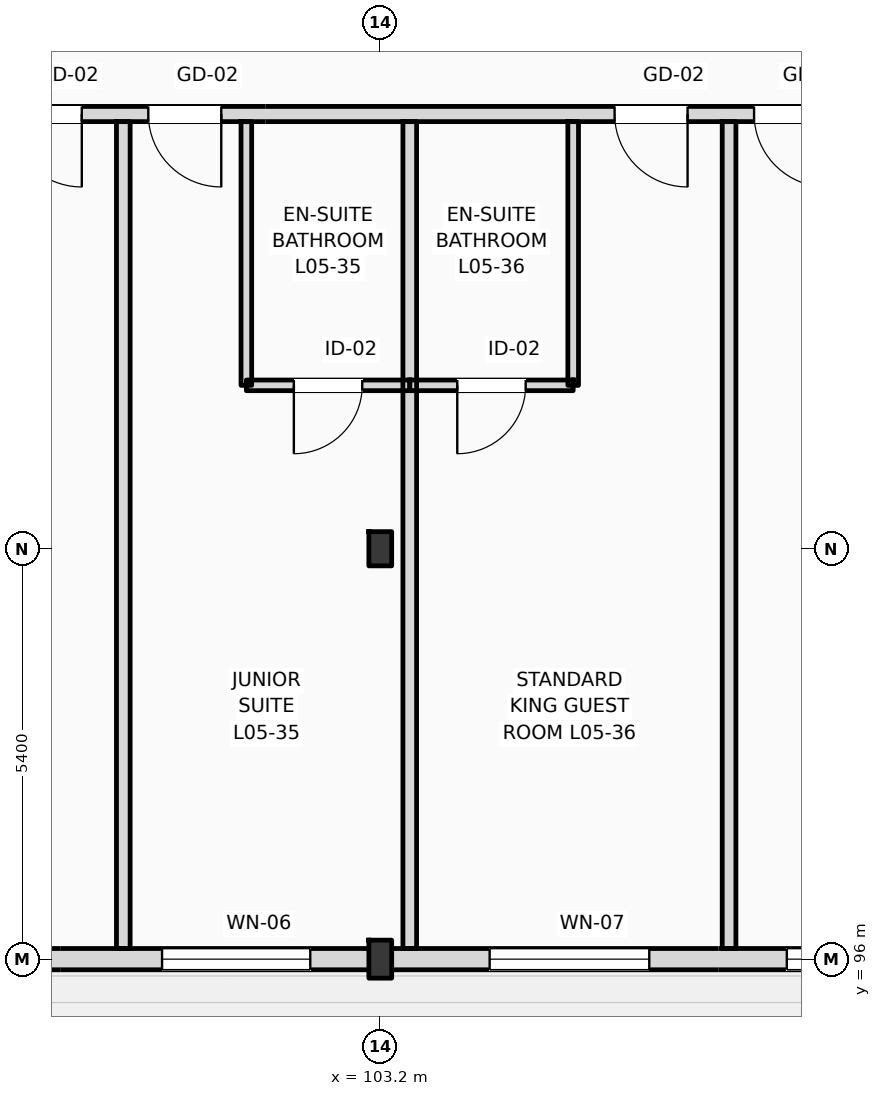
"""IFC4 building model, lengths in metres.
Left out: names, types, materials, properties, quantities, classifications, styles, units other than length and angle.
Written with IfcOpenShell. Run it as: python <this file> out.ifc"""

import sys

from ifc_helpers import new_model, si_unit, direction, frame, frame_2d, origin, origin_2d, place, context, subcontext, project, spatial, rectangle, i_section, extrude, element, fill, save


model = new_model("IFC4")
c1 = context("Model", 3, precision=1e-05, world=origin(), true_north=direction((0.0, 1.0)))
c2 = subcontext(c1, "Body", "Model", "MODEL_VIEW")
j1 = project(units=[si_unit("LENGTHUNIT", "METRE"), si_unit("PLANEANGLEUNIT", "RADIAN")], contexts=[c1])
p1 = place(None, origin())
s1 = spatial("IfcSite", under=j1, at=p1, CompositionType="ELEMENT")
p2 = place(p1, origin())
s2 = spatial("IfcBuilding", under=s1, at=p2, CompositionType="ELEMENT")
p3 = place(p2, frame((0.0, 0.0, 24.6)))
s3 = spatial("IfcBuildingStorey", under=s2, at=p3, CompositionType="ELEMENT", Elevation=24.6)
p4 = place(p3, frame((103.2, 96.0, 0.0), z_axis=(0.0, 0.0, 1.0), x_axis=(1.0, 0.0, 0.0)))
e1 = element("IfcColumn", 1, at=p4, inside=s3, PredefinedType="COLUMN", context=c2, shape_type="SweptSolid", body=[
    extrude(i_section(OverallWidth=0.3, OverallDepth=0.5, WebThickness=0.014, FlangeThickness=0.028, FilletRadius=0.027, at=origin_2d()), origin(), (0.0, 0.0, 1.0), 3.6),
])
p5 = place(p3, frame((103.2, 101.4, 0.0), z_axis=(0.0, 0.0, 1.0), x_axis=(1.0, 0.0, 0.0)))
e2 = element("IfcColumn", 2, at=p5, inside=s3, PredefinedType="COLUMN", context=c2, shape_type="SweptSolid", body=[
    extrude(i_section(OverallWidth=0.3, OverallDepth=0.45, WebThickness=0.014, FlangeThickness=0.026, FilletRadius=0.027, at=origin_2d()), origin(), (0.0, 0.0, 1.0), 3.6),
])
p6 = place(p3, frame((25.2, 96.0, 0.0), z_axis=(0.0, 0.0, 1.0), x_axis=(1.0, 0.0, 0.0)))
e3 = element("IfcWall", 3, at=p6, inside=s3, PredefinedType="STANDARD", context=c2, shape_type="SweptSolid", body=[
    extrude(rectangle(XDim=94.8, YDim=0.28, at=frame_2d((47.4, 0.0))), origin(), (0.0, 0.0, 1.0), 2.78),
])
p7 = place(p6, frame((16.539, 0.0, 0.9)))
e4 = element("IfcOpeningElement", 4, at=p7, cuts=e3, PredefinedType="OPENING", context=c2, shape_type="SweptSolid", body=[
    extrude(rectangle(XDim=1.75, YDim=1.7, at=frame_2d((0.875, 0.85))), frame((0.0, 0.15, 0.0), z_axis=(0.0, -1.0, 0.0), x_axis=(1.0, 0.0, 0.0)), (0.0, 0.0, 1.0), 0.3),
])
p8 = place(p6, frame((20.367, 0.0, 0.9)))
e5 = element("IfcOpeningElement", 5, at=p8, cuts=e3, PredefinedType="OPENING", context=c2, shape_type="SweptSolid", body=[
    extrude(rectangle(XDim=2.0, YDim=1.7, at=frame_2d((1.0, 0.85))), frame((0.0, 0.15, 0.0), z_axis=(0.0, -1.0, 0.0), x_axis=(1.0, 0.0, 0.0)), (0.0, 0.0, 1.0), 0.3),
])
p9 = place(p6, frame((24.326, 0.0, 0.9)))
e6 = element("IfcOpeningElement", 6, at=p9, cuts=e3, PredefinedType="OPENING", context=c2, shape_type="SweptSolid", body=[
    extrude(rectangle(XDim=2.3, YDim=1.7, at=frame_2d((1.15, 0.85))), frame((0.0, 0.15, 0.0), z_axis=(0.0, -1.0, 0.0), x_axis=(1.0, 0.0, 0.0)), (0.0, 0.0, 1.0), 0.3),
])
p10 = place(p6, frame((27.684, 0.0, 0.9)))
e7 = element("IfcOpeningElement", 7, at=p10, cuts=e3, PredefinedType="OPENING", context=c2, shape_type="SweptSolid", body=[
    extrude(rectangle(XDim=2.6, YDim=1.7, at=frame_2d((1.3, 0.85))), frame((0.0, 0.15, 0.0), z_axis=(0.0, -1.0, 0.0), x_axis=(1.0, 0.0, 0.0)), (0.0, 0.0, 1.0), 0.3),
])
p11 = place(p6, frame((32.083, 0.0, 0.9)))
e8 = element("IfcOpeningElement", 8, at=p11, cuts=e3, PredefinedType="OPENING", context=c2, shape_type="SweptSolid", body=[
    extrude(rectangle(XDim=2.419, YDim=1.7, at=frame_2d((1.209, 0.85))), frame((0.0, 0.15, 0.0), z_axis=(0.0, -1.0, 0.0), x_axis=(1.0, 0.0, 0.0)), (0.0, 0.0, 1.0), 0.3),
])
p12 = place(p6, frame((35.322, 0.0, 0.9)))
e9 = element("IfcOpeningElement", 9, at=p12, cuts=e3, PredefinedType="OPENING", context=c2, shape_type="SweptSolid", body=[
    extrude(rectangle(XDim=2.868, YDim=1.7, at=frame_2d((1.434, 0.85))), frame((0.0, 0.15, 0.0), z_axis=(0.0, -1.0, 0.0), x_axis=(1.0, 0.0, 0.0)), (0.0, 0.0, 1.0), 0.3),
])
p13 = place(p6, frame((56.015, 0.0, 0.9)))
e10 = element("IfcOpeningElement", 10, at=p13, cuts=e3, PredefinedType="OPENING", context=c2, shape_type="SweptSolid", body=[
    extrude(rectangle(XDim=1.2, YDim=1.7, at=frame_2d((0.6, 0.85))), frame((0.0, 0.15, 0.0), z_axis=(0.0, -1.0, 0.0), x_axis=(1.0, 0.0, 0.0)), (0.0, 0.0, 1.0), 0.3),
])
p14 = place(p6, frame((59.888, 0.0, 0.9)))
e11 = element("IfcOpeningElement", 11, at=p14, cuts=e3, PredefinedType="OPENING", context=c2, shape_type="SweptSolid", body=[
    extrude(rectangle(XDim=1.35, YDim=1.7, at=frame_2d((0.675, 0.85))), frame((0.0, 0.15, 0.0), z_axis=(0.0, -1.0, 0.0), x_axis=(1.0, 0.0, 0.0)), (0.0, 0.0, 1.0), 0.3),
])
p15 = place(p6, frame((63.799, 0.0, 0.9)))
e12 = element("IfcOpeningElement", 12, at=p15, cuts=e3, PredefinedType="OPENING", context=c2, shape_type="SweptSolid", body=[
    extrude(rectangle(XDim=1.5, YDim=1.7, at=frame_2d((0.75, 0.85))), frame((0.0, 0.15, 0.0), z_axis=(0.0, -1.0, 0.0), x_axis=(1.0, 0.0, 0.0)), (0.0, 0.0, 1.0), 0.3),
])
p16 = place(p6, frame((67.709, 0.0, 0.9)))
e13 = element("IfcOpeningElement", 13, at=p16, cuts=e3, PredefinedType="OPENING", context=c2, shape_type="SweptSolid", body=[
    extrude(rectangle(XDim=1.65, YDim=1.7, at=frame_2d((0.825, 0.85))), frame((0.0, 0.15, 0.0), z_axis=(0.0, -1.0, 0.0), x_axis=(1.0, 0.0, 0.0)), (0.0, 0.0, 1.0), 0.3),
])
p17 = place(p6, frame((71.618, 0.0, 0.9)))
e14 = element("IfcOpeningElement", 14, at=p17, cuts=e3, PredefinedType="OPENING", context=c2, shape_type="SweptSolid", body=[
    extrude(rectangle(XDim=1.8, YDim=1.7, at=frame_2d((0.9, 0.85))), frame((0.0, 0.15, 0.0), z_axis=(0.0, -1.0, 0.0), x_axis=(1.0, 0.0, 0.0)), (0.0, 0.0, 1.0), 0.3),
])
p18 = place(p6, frame((75.129, 0.0, 0.9)))
e15 = element("IfcOpeningElement", 15, at=p18, cuts=e3, PredefinedType="OPENING", context=c2, shape_type="SweptSolid", body=[
    extrude(rectangle(XDim=1.95, YDim=1.7, at=frame_2d((0.975, 0.85))), frame((0.0, 0.15, 0.0), z_axis=(0.0, -1.0, 0.0), x_axis=(1.0, 0.0, 0.0)), (0.0, 0.0, 1.0), 0.3),
])
p19 = place(p6, frame((79.439, 0.0, 0.9)))
e16 = element("IfcOpeningElement", 16, at=p19, cuts=e3, PredefinedType="OPENING", context=c2, shape_type="SweptSolid", body=[
    extrude(rectangle(XDim=2.1, YDim=1.7, at=frame_2d((1.05, 0.85))), frame((0.0, 0.15, 0.0), z_axis=(0.0, -1.0, 0.0), x_axis=(1.0, 0.0, 0.0)), (0.0, 0.0, 1.0), 0.3),
])
p20 = place(p6, frame((83.349, 0.0, 0.9)))
e17 = element("IfcOpeningElement", 17, at=p20, cuts=e3, PredefinedType="OPENING", context=c2, shape_type="SweptSolid", body=[
    extrude(rectangle(XDim=2.25, YDim=1.7, at=frame_2d((1.125, 0.85))), frame((0.0, 0.15, 0.0), z_axis=(0.0, -1.0, 0.0), x_axis=(1.0, 0.0, 0.0)), (0.0, 0.0, 1.0), 0.3),
])
p21 = place(p6, frame((87.258, 0.0, 0.9)))
e18 = element("IfcOpeningElement", 18, at=p21, cuts=e3, PredefinedType="OPENING", context=c2, shape_type="SweptSolid", body=[
    extrude(rectangle(XDim=2.4, YDim=1.7, at=frame_2d((1.2, 0.85))), frame((0.0, 0.15, 0.0), z_axis=(0.0, -1.0, 0.0), x_axis=(1.0, 0.0, 0.0)), (0.0, 0.0, 1.0), 0.3),
])
p22 = place(p6, frame((91.204, 0.0, 0.9)))
e19 = element("IfcOpeningElement", 19, at=p22, cuts=e3, PredefinedType="OPENING", context=c2, shape_type="SweptSolid", body=[
    extrude(rectangle(XDim=2.55, YDim=1.7, at=frame_2d((1.275, 0.85))), frame((0.0, 0.15, 0.0), z_axis=(0.0, -1.0, 0.0), x_axis=(1.0, 0.0, 0.0)), (0.0, 0.0, 1.0), 0.3),
])
p23 = place(p3, frame((79.76, 107.12, 0.0), z_axis=(0.0, 0.0, 1.0), x_axis=(1.0, 0.0, 0.0)))
e20 = element("IfcWall", 20, at=p23, inside=s3, PredefinedType="PARTITIONING", context=c2, shape_type="SweptSolid", body=[
    extrude(rectangle(XDim=40.1, YDim=0.2, at=frame_2d((20.05, 0.0))), origin(), (0.0, 0.0, 1.0), 3.34),
])
p24 = place(p23, frame((2.65, 0.0, 0.0)))
e21 = element("IfcOpeningElement", 21, at=p24, cuts=e20, PredefinedType="OPENING", context=c2, shape_type="SweptSolid", body=[
    extrude(rectangle(XDim=0.96, YDim=2.2, at=frame_2d((0.48, 1.1))), frame((0.0, 0.11, 0.0), z_axis=(0.0, -1.0, 0.0), x_axis=(1.0, 0.0, 0.0)), (0.0, 0.0, 1.0), 0.22),
])
p25 = place(p23, frame((4.448, 0.0, 0.0)))
e22 = element("IfcOpeningElement", 22, at=p25, cuts=e20, PredefinedType="OPENING", context=c2, shape_type="SweptSolid", body=[
    extrude(rectangle(XDim=0.96, YDim=2.2, at=frame_2d((0.48, 1.1))), frame((0.0, 0.11, 0.0), z_axis=(0.0, -1.0, 0.0), x_axis=(1.0, 0.0, 0.0)), (0.0, 0.0, 1.0), 0.22),
])
p26 = place(p23, frame((10.583, 0.0, 0.0)))
e23 = element("IfcOpeningElement", 23, at=p26, cuts=e20, PredefinedType="OPENING", context=c2, shape_type="SweptSolid", body=[
    extrude(rectangle(XDim=0.96, YDim=2.2, at=frame_2d((0.48, 1.1))), frame((0.0, 0.11, 0.0), z_axis=(0.0, -1.0, 0.0), x_axis=(1.0, 0.0, 0.0)), (0.0, 0.0, 1.0), 0.22),
])
p27 = place(p23, frame((12.418, 0.0, 0.0)))
e24 = element("IfcOpeningElement", 24, at=p27, cuts=e20, PredefinedType="OPENING", context=c2, shape_type="SweptSolid", body=[
    extrude(rectangle(XDim=0.96, YDim=2.2, at=frame_2d((0.48, 1.1))), frame((0.0, 0.11, 0.0), z_axis=(0.0, -1.0, 0.0), x_axis=(1.0, 0.0, 0.0)), (0.0, 0.0, 1.0), 0.22),
])
p28 = place(p23, frame((18.553, 0.0, 0.0)))
e25 = element("IfcOpeningElement", 25, at=p28, cuts=e20, PredefinedType="OPENING", context=c2, shape_type="SweptSolid", body=[
    extrude(rectangle(XDim=0.96, YDim=2.2, at=frame_2d((0.48, 1.1))), frame((0.0, 0.11, 0.0), z_axis=(0.0, -1.0, 0.0), x_axis=(1.0, 0.0, 0.0)), (0.0, 0.0, 1.0), 0.22),
])
p29 = place(p23, frame((20.388, 0.0, 0.0)))
e26 = element("IfcOpeningElement", 26, at=p29, cuts=e20, PredefinedType="OPENING", context=c2, shape_type="SweptSolid", body=[
    extrude(rectangle(XDim=0.96, YDim=2.2, at=frame_2d((0.48, 1.1))), frame((0.0, 0.11, 0.0), z_axis=(0.0, -1.0, 0.0), x_axis=(1.0, 0.0, 0.0)), (0.0, 0.0, 1.0), 0.22),
])
p30 = place(p23, frame((26.523, 0.0, 0.0)))
e27 = element("IfcOpeningElement", 27, at=p30, cuts=e20, PredefinedType="OPENING", context=c2, shape_type="SweptSolid", body=[
    extrude(rectangle(XDim=0.96, YDim=2.2, at=frame_2d((0.48, 1.1))), frame((0.0, 0.11, 0.0), z_axis=(0.0, -1.0, 0.0), x_axis=(1.0, 0.0, 0.0)), (0.0, 0.0, 1.0), 0.22),
])
p31 = place(p23, frame((28.358, 0.0, 0.0)))
e28 = element("IfcOpeningElement", 28, at=p31, cuts=e20, PredefinedType="OPENING", context=c2, shape_type="SweptSolid", body=[
    extrude(rectangle(XDim=0.96, YDim=2.2, at=frame_2d((0.48, 1.1))), frame((0.0, 0.11, 0.0), z_axis=(0.0, -1.0, 0.0), x_axis=(1.0, 0.0, 0.0)), (0.0, 0.0, 1.0), 0.22),
])
p32 = place(p23, frame((34.493, 0.0, 0.0)))
e29 = element("IfcOpeningElement", 29, at=p32, cuts=e20, PredefinedType="OPENING", context=c2, shape_type="SweptSolid", body=[
    extrude(rectangle(XDim=0.96, YDim=2.2, at=frame_2d((0.48, 1.1))), frame((0.0, 0.11, 0.0), z_axis=(0.0, -1.0, 0.0), x_axis=(1.0, 0.0, 0.0)), (0.0, 0.0, 1.0), 0.22),
])
p33 = place(p23, frame((36.364, 0.0, 0.0)))
e30 = element("IfcOpeningElement", 30, at=p33, cuts=e20, PredefinedType="OPENING", context=c2, shape_type="SweptSolid", body=[
    extrude(rectangle(XDim=0.96, YDim=2.2, at=frame_2d((0.48, 1.1))), frame((0.0, 0.11, 0.0), z_axis=(0.0, -1.0, 0.0), x_axis=(1.0, 0.0, 0.0)), (0.0, 0.0, 1.0), 0.22),
])
for number, where, z_axis, x_axis in (
    (31, (99.819, 96.14, 0.0), (0.0, 0.0, 1.0), (0.0, 1.0, 0.0)),
    (32, (103.588, 96.14, 0.0), (0.0, 0.0, 1.0), (0.0, 1.0, 0.0)),
):
    element("IfcWall", number, at=place(p3, frame(where, z_axis=z_axis, x_axis=x_axis)), inside=s3, PredefinedType="PARTITIONING", context=c2, shape_type="SweptSolid", body=[
        extrude(rectangle(XDim=10.88, YDim=0.18, at=frame_2d((5.44, 0.0))), origin(), (0.0, 0.0, 1.0), 3.34),
    ])
p34 = place(p3, frame((101.438, 103.55, 0.0), z_axis=(0.0, 0.0, 1.0), x_axis=(0.0, 1.0, 0.0)))
e33 = element("IfcWall", 33, at=p34, inside=s3, PredefinedType="PARTITIONING", context=c2, shape_type="SweptSolid", body=[
    extrude(rectangle(XDim=3.47, YDim=0.14, at=frame_2d((1.735, 0.0))), origin(), (0.0, 0.0, 1.0), 3.34),
])
p35 = place(p3, frame((101.438, 103.55, 0.0), z_axis=(0.0, 0.0, 1.0), x_axis=(1.0, 0.0, 0.0)))
e34 = element("IfcWall", 34, at=p35, inside=s3, PredefinedType="PARTITIONING", context=c2, shape_type="SweptSolid", body=[
    extrude(rectangle(XDim=2.15, YDim=0.14, at=frame_2d((1.075, 0.0))), origin(), (0.0, 0.0, 1.0), 3.34),
])
p36 = place(p35, frame((0.625, 0.0, 0.0)))
e35 = element("IfcOpeningElement", 35, at=p36, cuts=e34, PredefinedType="OPENING", context=c2, shape_type="SweptSolid", body=[
    extrude(rectangle(XDim=0.9, YDim=2.1, at=frame_2d((0.45, 1.05))), frame((0.0, 0.08, 0.0), z_axis=(0.0, -1.0, 0.0), x_axis=(1.0, 0.0, 0.0)), (0.0, 0.0, 1.0), 0.16),
])
p37 = place(p3, frame((107.789, 96.14, 0.0), z_axis=(0.0, 0.0, 1.0), x_axis=(0.0, 1.0, 0.0)))
e36 = element("IfcWall", 36, at=p37, inside=s3, PredefinedType="PARTITIONING", context=c2, shape_type="SweptSolid", body=[
    extrude(rectangle(XDim=10.88, YDim=0.18, at=frame_2d((5.44, 0.0))), origin(), (0.0, 0.0, 1.0), 3.34),
])
p38 = place(p3, frame((105.738, 103.55, 0.0), z_axis=(0.0, 0.0, 1.0), x_axis=(0.0, 1.0, 0.0)))
e37 = element("IfcWall", 37, at=p38, inside=s3, PredefinedType="PARTITIONING", context=c2, shape_type="SweptSolid", body=[
    extrude(rectangle(XDim=3.47, YDim=0.14, at=frame_2d((1.735, 0.0))), origin(), (0.0, 0.0, 1.0), 3.34),
])
p39 = place(p3, frame((103.588, 103.55, 0.0), z_axis=(0.0, 0.0, 1.0), x_axis=(1.0, 0.0, 0.0)))
e38 = element("IfcWall", 38, at=p39, inside=s3, PredefinedType="PARTITIONING", context=c2, shape_type="SweptSolid", body=[
    extrude(rectangle(XDim=2.15, YDim=0.14, at=frame_2d((1.075, 0.0))), origin(), (0.0, 0.0, 1.0), 3.34),
])
p40 = place(p39, frame((0.625, 0.0, 0.0)))
e39 = element("IfcOpeningElement", 39, at=p40, cuts=e38, PredefinedType="OPENING", context=c2, shape_type="SweptSolid", body=[
    extrude(rectangle(XDim=0.9, YDim=2.1, at=frame_2d((0.45, 1.05))), frame((0.0, 0.08, 0.0), z_axis=(0.0, -1.0, 0.0), x_axis=(1.0, 0.0, 0.0)), (0.0, 0.0, 1.0), 0.16),
])
p41 = place(p18, origin())
e40 = element("IfcWindow", 40, at=p41, inside=s3, PartitioningType="DOUBLE_PANEL_VERTICAL", PredefinedType="WINDOW", context=c2, shape_type="SweptSolid", body=[
    extrude(rectangle(XDim=1.95, YDim=1.7, at=frame_2d((0.975, 0.85))), frame((0.0, 0.03, 0.0), z_axis=(0.0, -1.0, 0.0), x_axis=(1.0, 0.0, 0.0)), (0.0, 0.0, 1.0), 0.06),
])
fill(e15, e40)
p42 = place(p19, origin())
e41 = element("IfcWindow", 41, at=p42, inside=s3, PartitioningType="DOUBLE_PANEL_VERTICAL", PredefinedType="WINDOW", context=c2, shape_type="SweptSolid", body=[
    extrude(rectangle(XDim=2.1, YDim=1.7, at=frame_2d((1.05, 0.85))), frame((0.0, 0.03, 0.0), z_axis=(0.0, -1.0, 0.0), x_axis=(1.0, 0.0, 0.0)), (0.0, 0.0, 1.0), 0.06),
])
fill(e16, e41)
p43 = place(p20, origin())
e42 = element("IfcWindow", 42, at=p43, inside=s3, PartitioningType="DOUBLE_PANEL_VERTICAL", PredefinedType="WINDOW", context=c2, shape_type="SweptSolid", body=[
    extrude(rectangle(XDim=2.25, YDim=1.7, at=frame_2d((1.125, 0.85))), frame((0.0, 0.03, 0.0), z_axis=(0.0, -1.0, 0.0), x_axis=(1.0, 0.0, 0.0)), (0.0, 0.0, 1.0), 0.06),
])
fill(e17, e42)
p44 = place(p28, frame((0.96, 0.0, 0.0), z_axis=(0.0, 0.0, 1.0), x_axis=(-1.0, 0.0, 0.0)))
e43 = element("IfcDoor", 43, at=p44, inside=s3, OperationType="SINGLE_SWING_RIGHT", PredefinedType="DOOR", context=c2, shape_type="SweptSolid", body=[
    extrude(rectangle(XDim=0.96, YDim=2.2, at=frame_2d((0.48, 1.1))), frame((0.0, 0.025, 0.0), z_axis=(0.0, -1.0, 0.0), x_axis=(1.0, 0.0, 0.0)), (0.0, 0.0, 1.0), 0.05),
])
fill(e25, e43)
p45 = place(p29, frame((0.96, 0.0, 0.0), z_axis=(0.0, 0.0, 1.0), x_axis=(-1.0, 0.0, 0.0)))
e44 = element("IfcDoor", 44, at=p45, inside=s3, OperationType="SINGLE_SWING_RIGHT", PredefinedType="DOOR", context=c2, shape_type="SweptSolid", body=[
    extrude(rectangle(XDim=0.96, YDim=2.2, at=frame_2d((0.48, 1.1))), frame((0.0, 0.025, 0.0), z_axis=(0.0, -1.0, 0.0), x_axis=(1.0, 0.0, 0.0)), (0.0, 0.0, 1.0), 0.05),
])
fill(e26, e44)
p46 = place(p36, frame((0.9, 0.0, 0.0), z_axis=(0.0, 0.0, 1.0), x_axis=(-1.0, 0.0, 0.0)))
e45 = element("IfcDoor", 45, at=p46, inside=s3, OperationType="SINGLE_SWING_LEFT", PredefinedType="DOOR", context=c2, shape_type="SweptSolid", body=[
    extrude(rectangle(XDim=0.9, YDim=2.1, at=frame_2d((0.45, 1.05))), frame((0.0, 0.025, 0.0), z_axis=(0.0, -1.0, 0.0), x_axis=(1.0, 0.0, 0.0)), (0.0, 0.0, 1.0), 0.05),
])
fill(e35, e45)
p47 = place(p30, frame((0.96, 0.0, 0.0), z_axis=(0.0, 0.0, 1.0), x_axis=(-1.0, 0.0, 0.0)))
e46 = element("IfcDoor", 46, at=p47, inside=s3, OperationType="SINGLE_SWING_RIGHT", PredefinedType="DOOR", context=c2, shape_type="SweptSolid", body=[
    extrude(rectangle(XDim=0.96, YDim=2.2, at=frame_2d((0.48, 1.1))), frame((0.0, 0.025, 0.0), z_axis=(0.0, -1.0, 0.0), x_axis=(1.0, 0.0, 0.0)), (0.0, 0.0, 1.0), 0.05),
])
fill(e27, e46)
p48 = place(p40, frame((0.9, 0.0, 0.0), z_axis=(0.0, 0.0, 1.0), x_axis=(-1.0, 0.0, 0.0)))
e47 = element("IfcDoor", 47, at=p48, inside=s3, OperationType="SINGLE_SWING_LEFT", PredefinedType="DOOR", context=c2, shape_type="SweptSolid", body=[
    extrude(rectangle(XDim=0.9, YDim=2.1, at=frame_2d((0.45, 1.05))), frame((0.0, 0.025, 0.0), z_axis=(0.0, -1.0, 0.0), x_axis=(1.0, 0.0, 0.0)), (0.0, 0.0, 1.0), 0.05),
])
fill(e39, e47)
p49 = place(p31, frame((0.96, 0.0, 0.0), z_axis=(0.0, 0.0, 1.0), x_axis=(-1.0, 0.0, 0.0)))
e48 = element("IfcDoor", 48, at=p49, inside=s3, OperationType="SINGLE_SWING_RIGHT", PredefinedType="DOOR", context=c2, shape_type="SweptSolid", body=[
    extrude(rectangle(XDim=0.96, YDim=2.2, at=frame_2d((0.48, 1.1))), frame((0.0, 0.025, 0.0), z_axis=(0.0, -1.0, 0.0), x_axis=(1.0, 0.0, 0.0)), (0.0, 0.0, 1.0), 0.05),
])
fill(e28, e48)
save(model, sys.argv[1])
